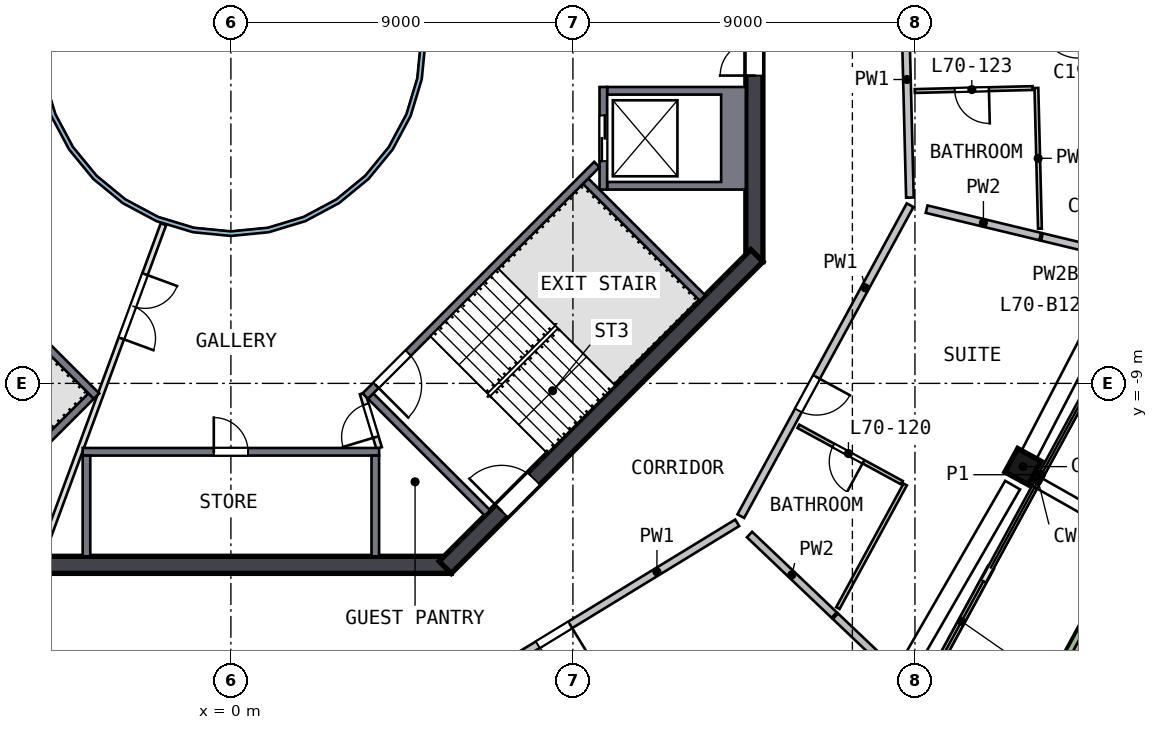
"""IFC4 building model, lengths in metres.
Left out: names, types, materials, properties, quantities, classifications, styles, units other than length and angle.
Written with IfcOpenShell. Run it as: python <this file> out.ifc"""

import sys

from ifc_helpers import new_model, si_unit, direction, frame, frame_2d, origin, origin_2d, place, context, subcontext, project, spatial, polyline, rectangle, outline, extrude, element, fill, save


model = new_model("IFC4")
c1 = context("Model", 3, precision=1e-05, world=origin(), true_north=direction((0.0, 1.0)))
c2 = subcontext(c1, "Body", "Model", "MODEL_VIEW")
j1 = project(units=[si_unit("LENGTHUNIT", "METRE"), si_unit("PLANEANGLEUNIT", "RADIAN")], contexts=[c1])
p1 = place(None, origin())
s1 = spatial("IfcSite", under=j1, at=p1, CompositionType="ELEMENT")
p2 = place(p1, origin())
s2 = spatial("IfcBuilding", under=s1, at=p2, CompositionType="ELEMENT")
p3 = place(p2, frame((0.0, 0.0, 284.5)))
s3 = spatial("IfcBuildingStorey", under=s2, at=p3, CompositionType="ELEMENT", Elevation=284.5)
p4 = place(p3, frame((20.78, -11.311, 0.0), z_axis=(0.053005442, 0.099318662, 0.993642907), x_axis=(0.475262413, 0.872612609, -0.112573854)))
e1 = element("IfcColumn", 1, at=p4, inside=s3, PredefinedType="COLUMN", context=c2, shape_type="SweptSolid", body=[
    extrude(rectangle(XDim=0.7, YDim=0.7, at=origin_2d()), origin(), (0.0, 0.0, 1.0), 3.21),
])
p5 = place(p3, frame((13.775, -5.799, 0.0), z_axis=(0.0, 0.0, 1.0), x_axis=(0.0, 1.0, 0.0)))
e2 = element("IfcWall", 2, at=p5, inside=s3, PredefinedType="SHEAR", context=c2, shape_type="SweptSolid", body=[
    extrude(rectangle(XDim=11.598, YDim=0.45, at=frame_2d((5.799, 0.0))), origin(), (0.0, 0.0, 1.0), 3.5),
])
p6 = place(p5, frame((4.899, 0.0, 0.0)))
e3 = element("IfcOpeningElement", 3, at=p6, cuts=e2, PredefinedType="OPENING", context=c2, shape_type="SweptSolid", body=[
    extrude(rectangle(XDim=1.8, YDim=2.1, at=frame_2d((0.9, 1.05))), frame((0.0, 0.235, 0.0), z_axis=(0.0, -1.0, 0.0), x_axis=(1.0, 0.0, 0.0)), (0.0, 0.0, 1.0), 0.47),
])
p7 = place(p3, frame((-5.799, -13.775, 0.0), z_axis=(0.0, 0.0, 1.0), x_axis=(1.0, 0.0, 0.0)))
e4 = element("IfcWall", 4, at=p7, inside=s3, PredefinedType="SHEAR", context=c2, shape_type="SweptSolid", body=[
    extrude(rectangle(XDim=11.598, YDim=0.45, at=frame_2d((5.799, 0.0))), origin(), (0.0, 0.0, 1.0), 3.5),
])
p8 = place(p3, frame((5.64, -13.841, 0.0), z_axis=(0.0, 0.0, 1.0), x_axis=(0.707106781, 0.707106781, 0.0)))
e5 = element("IfcWall", 5, at=p8, inside=s3, PredefinedType="SHEAR", context=c2, shape_type="SweptSolid", body=[
    extrude(rectangle(XDim=11.598, YDim=0.45, at=frame_2d((5.799, 0.0))), origin(), (0.0, 0.0, 1.0), 3.5),
])
p9 = place(p8, frame((2.099, 0.0, 0.0)))
e6 = element("IfcOpeningElement", 6, at=p9, cuts=e5, PredefinedType="OPENING", context=c2, shape_type="SweptSolid", body=[
    extrude(rectangle(XDim=1.2, YDim=2.1, at=frame_2d((0.6, 1.05))), frame((0.0, 0.235, 0.0), z_axis=(0.0, -1.0, 0.0), x_axis=(1.0, 0.0, 0.0)), (0.0, 0.0, 1.0), 0.47),
])
p10 = place(p3, frame((18.181, -17.183, 0.0), z_axis=(0.0, 0.0, 1.0), x_axis=(0.478120193, 0.878294416, 0.0)))
e7 = element("IfcWall", 7, at=p10, inside=s3, PredefinedType="SOLIDWALL", context=c2, shape_type="SweptSolid", body=[
    extrude(rectangle(XDim=3.787, YDim=0.15, at=frame_2d((1.894, 0.0))), origin(), (0.0, 0.0, 1.0), 2.525),
])
p11 = place(p10, frame((0.987, 0.0, 0.0)))
e8 = element("IfcOpeningElement", 8, at=p11, cuts=e7, PredefinedType="OPENING", context=c2, shape_type="SweptSolid", body=[
    extrude(rectangle(XDim=2.4, YDim=2.4, at=frame_2d((1.2, 1.2))), frame((0.0, 0.085, 0.0), z_axis=(0.0, -1.0, 0.0), x_axis=(1.0, 0.0, 0.0)), (0.0, 0.0, 1.0), 0.17),
])
p12 = place(p3, frame((21.029, -18.278, 0.0), z_axis=(0.0, 0.0, 1.0), x_axis=(0.478078384, 0.878317174, 0.0)))
e9 = element("IfcWall", 9, at=p12, inside=s3, PredefinedType="SOLIDWALL", context=c2, shape_type="SweptSolid", body=[
    extrude(rectangle(XDim=13.223, YDim=0.5, at=frame_2d((6.612, 0.0))), origin(), (0.0, 0.0, 1.0), 0.7),
])
p13 = place(p3, origin())
e10 = element("IfcWall", 10, at=p13, inside=s3, PredefinedType="SOLIDWALL", context=c2, shape_type="SweptSolid", body=[
    extrude(outline(polyline([(13.55, -3.9), (9.9, -3.9), (9.9, -3.7), (12.9, -3.7), (12.9, -1.4), (9.9, -1.4), (9.9, -1.2), (13.55, -1.2), (13.55, -3.9)])), origin(), (0.0, 0.0, 1.0), 3.19),
])
p14 = place(p3, frame((9.8, -1.2, 0.0), z_axis=(0.0, 0.0, 1.0), x_axis=(0.0, -1.0, 0.0)))
e11 = element("IfcWall", 11, at=p14, inside=s3, PredefinedType="SOLIDWALL", context=c2, shape_type="SweptSolid", body=[
    extrude(rectangle(XDim=2.7, YDim=0.2, at=frame_2d((1.35, 0.0))), origin(), (0.0, 0.0, 1.0), 3.19),
])
p15 = place(p14, frame((0.75, 0.0, 0.0)))
e12 = element("IfcOpeningElement", 12, at=p15, cuts=e11, PredefinedType="OPENING", context=c2, shape_type="SweptSolid", body=[
    extrude(rectangle(XDim=1.2, YDim=2.1, at=frame_2d((0.6, 1.05))), frame((0.0, 0.11, 0.0), z_axis=(0.0, -1.0, 0.0), x_axis=(1.0, 0.0, 0.0)), (0.0, 0.0, 1.0), 0.22),
])
p16 = place(p3, frame((-3.9, -10.8, 0.0), z_axis=(0.0, 0.0, 1.0), x_axis=(1.0, 0.0, 0.0)))
e13 = element("IfcWall", 13, at=p16, inside=s3, PredefinedType="SOLIDWALL", context=c2, shape_type="SweptSolid", body=[
    extrude(rectangle(XDim=7.8, YDim=0.2, at=frame_2d((3.9, 0.0))), origin(), (0.0, 0.0, 1.0), 3.19),
])
p17 = place(p16, frame((3.45, 0.0, 0.0)))
e14 = element("IfcOpeningElement", 14, at=p17, cuts=e13, PredefinedType="OPENING", context=c2, shape_type="SweptSolid", body=[
    extrude(rectangle(XDim=0.9, YDim=2.1, at=frame_2d((0.45, 1.05))), frame((0.0, 0.11, 0.0), z_axis=(0.0, -1.0, 0.0), x_axis=(1.0, 0.0, 0.0)), (0.0, 0.0, 1.0), 0.22),
])
for number, where, z_axis, x_axis in (
    (15, (-3.8, -10.9, 0.0), (0.0, 0.0, 1.0), (0.0, -1.0, 0.0)),
    (16, (3.8, -10.9, 0.0), (0.0, 0.0, 1.0), (0.0, -1.0, 0.0)),
):
    element("IfcWall", number, at=place(p3, frame(where, z_axis=z_axis, x_axis=x_axis)), inside=s3, PredefinedType="SOLIDWALL", context=c2, shape_type="SweptSolid", body=[
        extrude(rectangle(XDim=2.65, YDim=0.2, at=frame_2d((1.325, 0.0))), origin(), (0.0, 0.0, 1.0), 3.19),
    ])
p18 = place(p3, frame((-3.535, -9.334, 0.0), z_axis=(0.0, 0.0, 1.0), x_axis=(-0.707120946, 0.707092617, 0.0)))
e17 = element("IfcWall", 17, at=p18, inside=s3, PredefinedType="SOLIDWALL", context=c2, shape_type="SweptSolid", body=[
    extrude(rectangle(XDim=8.618, YDim=0.2, at=frame_2d((4.309, 0.0))), origin(), (0.0, 0.0, 1.0), 3.19),
])
p19 = place(p18, frame((6.6, 0.0, 0.0)))
e18 = element("IfcOpeningElement", 18, at=p19, cuts=e17, PredefinedType="OPENING", context=c2, shape_type="SweptSolid", body=[
    extrude(rectangle(XDim=1.2, YDim=2.1, at=frame_2d((0.6, 1.05))), frame((0.0, 0.11, 0.0), z_axis=(0.0, -1.0, 0.0), x_axis=(1.0, 0.0, 0.0)), (0.0, 0.0, 1.0), 0.22),
])
p20 = place(p3, frame((-3.677, -9.334, 0.0), z_axis=(0.0, 0.0, 1.0), x_axis=(-0.707106781, -0.707106781, 0.0)))
e19 = element("IfcWall", 19, at=p20, inside=s3, PredefinedType="SOLIDWALL", context=c2, shape_type="SweptSolid", body=[
    extrude(rectangle(XDim=4.35, YDim=0.2, at=frame_2d((2.175, 0.0))), origin(), (0.0, 0.0, 1.0), 3.19),
])
p21 = place(p3, frame((9.629, -3.24, 0.0), z_axis=(0.0, 0.0, 1.0), x_axis=(-0.707120946, -0.707092617, 0.0)))
e20 = element("IfcWall", 20, at=p21, inside=s3, PredefinedType="SOLIDWALL", context=c2, shape_type="SweptSolid", body=[
    extrude(rectangle(XDim=8.618, YDim=0.2, at=frame_2d((4.309, 0.0))), origin(), (0.0, 0.0, 1.0), 3.19),
])
p22 = place(p21, frame((7.018, 0.0, 0.0)))
e21 = element("IfcOpeningElement", 21, at=p22, cuts=e20, PredefinedType="OPENING", context=c2, shape_type="SweptSolid", body=[
    extrude(rectangle(XDim=1.2, YDim=2.1, at=frame_2d((0.6, 1.05))), frame((0.0, 0.11, 0.0), z_axis=(0.0, -1.0, 0.0), x_axis=(1.0, 0.0, 0.0)), (0.0, 0.0, 1.0), 0.22),
])
for number, where, z_axis, x_axis in (
    (22, (3.677, -9.334, 0.0), (0.0, 0.0, 1.0), (0.707, -0.707, 0.0)),
    (23, (9.334, -3.677, 0.0), (0.0, 0.0, 1.0), (0.707, -0.707, 0.0)),
):
    element("IfcWall", number, at=place(p3, frame(where, z_axis=z_axis, x_axis=x_axis)), inside=s3, PredefinedType="SOLIDWALL", context=c2, shape_type="SweptSolid", body=[
        extrude(rectangle(XDim=4.35, YDim=0.2, at=frame_2d((2.175, 0.0))), origin(), (0.0, 0.0, 1.0), 3.19),
    ])
p23 = place(p3, frame((3.9, -10.7, 0.0), z_axis=(0.0, 0.0, 1.0), x_axis=(-0.289808785, 0.957084567, 0.0)))
e24 = element("IfcWall", 24, at=p23, inside=s3, PredefinedType="PARTITIONING", context=c2, shape_type="SweptSolid", body=[
    extrude(rectangle(XDim=1.501, YDim=0.15, at=frame_2d((0.75, 0.0))), origin(), (0.0, 0.0, 1.0), 3.19),
])
p24 = place(p23, frame((0.301, 0.0, 0.0)))
e25 = element("IfcOpeningElement", 25, at=p24, cuts=e24, PredefinedType="OPENING", context=c2, shape_type="SweptSolid", body=[
    extrude(rectangle(XDim=0.9, YDim=2.1, at=frame_2d((0.45, 1.05))), frame((0.0, 0.085, 0.0), z_axis=(0.0, -1.0, 0.0), x_axis=(1.0, 0.0, 0.0)), (0.0, 0.0, 1.0), 0.17),
])
p25 = place(p3, frame((-1.776, -4.813, 0.0), z_axis=(0.0, 0.0, 1.0), x_axis=(-0.346114844, -0.938192152, 0.0)))
e26 = element("IfcWall", 26, at=p25, inside=s3, PredefinedType="PARTITIONING", context=c2, shape_type="SweptSolid", body=[
    extrude(rectangle(XDim=9.283, YDim=0.15, at=frame_2d((4.641, 0.0))), origin(), (0.0, 0.0, 1.0), 3.19),
])
p26 = place(p25, frame((1.4, 0.0, 0.0)))
e27 = element("IfcOpeningElement", 27, at=p26, cuts=e26, PredefinedType="OPENING", context=c2, shape_type="SweptSolid", body=[
    extrude(rectangle(XDim=1.8, YDim=2.1, at=frame_2d((0.9, 1.05))), frame((0.0, 0.085, 0.0), z_axis=(0.0, -1.0, 0.0), x_axis=(1.0, 0.0, 0.0)), (0.0, 0.0, 1.0), 0.17),
])
p27 = place(p3, origin())
e28 = element("IfcWall", 28, at=p27, inside=s3, PredefinedType="SOLIDWALL", context=c2, shape_type="SweptSolid", body=[
    extrude(outline(polyline([(5.021, -0.999), (4.73, -1.959), (4.257, -2.844), (3.62, -3.62), (2.844, -4.257), (1.959, -4.73), (0.999, -5.021), (0.0, -5.12), (-0.999, -5.021), (-1.959, -4.73), (-2.844, -4.257), (-3.62, -3.62), (-4.257, -2.844), (-4.73, -1.959), (-5.021, -0.999), (-5.12, 0.0), (-5.021, 0.999), (-4.73, 1.959), (-4.257, 2.844), (-3.62, 3.62), (-2.844, 4.257), (-1.959, 4.73), (-0.999, 5.021), (0.0, 5.12), (0.999, 5.021), (1.959, 4.73), (2.844, 4.257), (3.62, 3.62), (4.257, 2.844), (4.73, 1.959), (5.021, 0.999), (5.12, 0.0), (5.021, -0.999)]), holes=[polyline([(4.904, 0.976), (4.619, 1.913), (4.157, 2.778), (3.535, 3.535), (2.778, 4.157), (1.913, 4.619), (0.976, 4.904), (0.0, 5.0), (-0.976, 4.904), (-1.913, 4.619), (-2.778, 4.157), (-3.535, 3.535), (-4.157, 2.778), (-4.619, 1.913), (-4.904, 0.976), (-5.0, 0.0), (-4.904, -0.976), (-4.619, -1.913), (-4.157, -2.778), (-3.535, -3.535), (-2.778, -4.157), (-1.913, -4.619), (-0.976, -4.904), (0.0, -5.0), (0.976, -4.904), (1.913, -4.619), (2.778, -4.157), (3.535, -3.535), (4.157, -2.778), (4.619, -1.913), (4.904, -0.976), (5.0, 0.0), (4.904, 0.976)])]), origin(), (0.0, 0.0, 1.0), 3.19),
])
p28 = place(p3, frame((-4.486, -17.777, 0.0), z_axis=(0.0, 0.0, 1.0), x_axis=(-0.878320972, 0.478071407, 0.0)))
e29 = element("IfcWall", 29, at=p28, inside=s3, PredefinedType="SOLIDWALL", context=c2, shape_type="SweptSolid", body=[
    extrude(rectangle(XDim=9.117, YDim=0.2, at=frame_2d((4.558, 0.0))), origin(), (0.0, 0.0, 1.0), 3.19),
])
p29 = place(p28, frame((6.458, 0.0, 0.0)))
e30 = element("IfcOpeningElement", 30, at=p29, cuts=e29, PredefinedType="OPENING", context=c2, shape_type="SweptSolid", body=[
    extrude(rectangle(XDim=1.0, YDim=2.1, at=frame_2d((0.5, 1.05))), frame((0.0, 0.11, 0.0), z_axis=(0.0, -1.0, 0.0), x_axis=(1.0, 0.0, 0.0)), (0.0, 0.0, 1.0), 0.22),
])
p30 = place(p3, frame((13.323, -12.669, 0.0), z_axis=(0.0, 0.0, 1.0), x_axis=(-0.853183358, -0.521611117, 0.0)))
e31 = element("IfcWall", 31, at=p30, inside=s3, PredefinedType="SOLIDWALL", context=c2, shape_type="SweptSolid", body=[
    extrude(rectangle(XDim=9.317, YDim=0.2, at=frame_2d((4.658, 0.0))), origin(), (0.0, 0.0, 1.0), 3.19),
])
p31 = place(p30, frame((5.15, 0.0, 0.0)))
e32 = element("IfcOpeningElement", 32, at=p31, cuts=e31, PredefinedType="OPENING", context=c2, shape_type="SweptSolid", body=[
    extrude(rectangle(XDim=1.0, YDim=2.1, at=frame_2d((0.5, 1.05))), frame((0.0, 0.11, 0.0), z_axis=(0.0, -1.0, 0.0), x_axis=(1.0, 0.0, 0.0)), (0.0, 0.0, 1.0), 0.22),
])
p32 = place(p3, frame((17.872, -4.311, 0.0), z_axis=(0.0, 0.0, 1.0), x_axis=(-0.478084491, -0.87831385, 0.0)))
e33 = element("IfcWall", 33, at=p32, inside=s3, PredefinedType="SOLIDWALL", context=c2, shape_type="SweptSolid", body=[
    extrude(rectangle(XDim=9.317, YDim=0.2, at=frame_2d((4.658, 0.0))), origin(), (0.0, 0.0, 1.0), 3.19),
])
p33 = place(p32, frame((5.15, 0.0, 0.0)))
e34 = element("IfcOpeningElement", 34, at=p33, cuts=e33, PredefinedType="OPENING", context=c2, shape_type="SweptSolid", body=[
    extrude(rectangle(XDim=1.0, YDim=2.1, at=frame_2d((0.5, 1.05))), frame((0.0, 0.11, 0.0), z_axis=(0.0, -1.0, 0.0), x_axis=(1.0, 0.0, 0.0)), (0.0, 0.0, 1.0), 0.22),
])
p34 = place(p3, frame((17.633, 5.203, 0.0), z_axis=(0.0, 0.0, 1.0), x_axis=(0.025130335, -0.999684183, 0.0)))
e35 = element("IfcWall", 35, at=p34, inside=s3, PredefinedType="SOLIDWALL", context=c2, shape_type="SweptSolid", body=[
    extrude(rectangle(XDim=9.317, YDim=0.2, at=frame_2d((4.658, 0.0))), origin(), (0.0, 0.0, 1.0), 3.19),
])
p35 = place(p34, frame((1.9, 0.0, 0.0)))
e36 = element("IfcOpeningElement", 36, at=p35, cuts=e35, PredefinedType="OPENING", context=c2, shape_type="SweptSolid", body=[
    extrude(rectangle(XDim=1.0, YDim=2.1, at=frame_2d((0.5, 1.05))), frame((0.0, 0.11, 0.0), z_axis=(0.0, -1.0, 0.0), x_axis=(1.0, 0.0, 0.0)), (0.0, 0.0, 1.0), 0.22),
])
p36 = place(p3, frame((13.647, -12.977, 0.0), z_axis=(0.0, 0.0, 1.0), x_axis=(0.724630592, -0.689137509, 0.0)))
e37 = element("IfcWall", 37, at=p36, inside=s3, PredefinedType="SOLIDWALL", context=c2, shape_type="SweptSolid", body=[
    extrude(rectangle(XDim=3.075, YDim=0.2, at=frame_2d((1.537, 0.0))), origin(), (0.0, 0.0, 1.0), 3.19),
])
p37 = place(p3, frame((15.908, -15.128, 0.0), z_axis=(0.0, 0.0, 1.0), x_axis=(0.724639029, -0.689128636, 0.0)))
e38 = element("IfcWall", 38, at=p37, inside=s3, PredefinedType="SOLIDWALL", context=c2, shape_type="SweptSolid", body=[
    extrude(rectangle(XDim=3.011, YDim=0.2, at=frame_2d((1.506, 0.0))), origin(), (0.0, 0.0, 1.0), 3.19),
])
p38 = place(p3, frame((18.307, -4.415, 0.0), z_axis=(0.0, 0.0, 1.0), x_axis=(0.972122163, -0.234474945, 0.0)))
e39 = element("IfcWall", 39, at=p38, inside=s3, PredefinedType="SOLIDWALL", context=c2, shape_type="SweptSolid", body=[
    extrude(rectangle(XDim=3.075, YDim=0.2, at=frame_2d((1.537, 0.0))), origin(), (0.0, 0.0, 1.0), 3.19),
])
p39 = place(p3, frame((21.341, -5.147, 0.0), z_axis=(0.0, 0.0, 1.0), x_axis=(0.972121732, -0.234476735, 0.0)))
e40 = element("IfcWall", 40, at=p39, inside=s3, PredefinedType="SOLIDWALL", context=c2, shape_type="SweptSolid", body=[
    extrude(rectangle(XDim=3.011, YDim=0.2, at=frame_2d((1.506, 0.0))), origin(), (0.0, 0.0, 1.0), 2.69),
])
p40 = place(p3, frame((17.655, -11.612, 0.0), z_axis=(0.0, 0.0, 1.0), x_axis=(-0.87832263, 0.478068361, 0.0)))
e41 = element("IfcWall", 41, at=p40, inside=s3, PredefinedType="PARTITIONING", context=c2, shape_type="SweptSolid", body=[
    extrude(rectangle(XDim=3.1, YDim=0.1, at=frame_2d((1.55, 0.0))), origin(), (0.0, 0.0, 1.0), 3.19),
])
p41 = place(p40, frame((1.15, 0.0, 0.0)))
e42 = element("IfcOpeningElement", 42, at=p41, cuts=e41, PredefinedType="OPENING", context=c2, shape_type="SweptSolid", body=[
    extrude(rectangle(XDim=0.9, YDim=2.1, at=frame_2d((0.45, 1.05))), frame((0.0, 0.06, 0.0), z_axis=(0.0, -1.0, 0.0), x_axis=(1.0, 0.0, 0.0)), (0.0, 0.0, 1.0), 0.12),
])
p42 = place(p3, frame((17.743, -11.66, 0.0), z_axis=(0.0, 0.0, 1.0), x_axis=(-0.478053023, -0.878330978, 0.0)))
e43 = element("IfcWall", 43, at=p42, inside=s3, PredefinedType="PARTITIONING", context=c2, shape_type="SweptSolid", body=[
    extrude(rectangle(XDim=3.704, YDim=0.1, at=frame_2d((1.852, 0.0))), origin(), (0.0, 0.0, 1.0), 3.19),
])
p43 = place(p3, frame((21.096, -1.229, 0.0), z_axis=(0.0, 0.0, 1.0), x_axis=(-0.999684391, -0.025122051, 0.0)))
e44 = element("IfcWall", 44, at=p43, inside=s3, PredefinedType="PARTITIONING", context=c2, shape_type="SweptSolid", body=[
    extrude(rectangle(XDim=3.1, YDim=0.1, at=frame_2d((1.55, 0.0))), origin(), (0.0, 0.0, 1.0), 3.19),
])
p44 = place(p43, frame((1.15, 0.0, 0.0)))
e45 = element("IfcOpeningElement", 45, at=p44, cuts=e44, PredefinedType="OPENING", context=c2, shape_type="SweptSolid", body=[
    extrude(rectangle(XDim=0.9, YDim=2.1, at=frame_2d((0.45, 1.05))), frame((0.0, 0.06, 0.0), z_axis=(0.0, -1.0, 0.0), x_axis=(1.0, 0.0, 0.0)), (0.0, 0.0, 1.0), 0.12),
])
p45 = place(p3, frame((21.289, -4.929, 0.0), z_axis=(0.0, 0.0, 1.0), x_axis=(-0.025112405, 0.999684634, 0.0)))
e46 = element("IfcWall", 46, at=p45, inside=s3, PredefinedType="PARTITIONING", context=c2, shape_type="SweptSolid", body=[
    extrude(rectangle(XDim=3.704, YDim=0.1, at=frame_2d((1.852, 0.0))), origin(), (0.0, 0.0, 1.0), 3.19),
])
p46 = place(p11, origin())
e47 = element("IfcDoor", 47, at=p46, inside=s3, OperationType="SLIDING_TO_LEFT", PredefinedType="DOOR", context=c2, shape_type="SweptSolid", body=[
    extrude(rectangle(XDim=2.4, YDim=2.4, at=frame_2d((1.2, 1.2))), frame((0.0, 0.025, 0.0), z_axis=(0.0, -1.0, 0.0), x_axis=(1.0, 0.0, 0.0)), (0.0, 0.0, 1.0), 0.05),
])
fill(e8, e47)
p47 = place(p17, origin())
e48 = element("IfcDoor", 48, at=p47, inside=s3, OperationType="SINGLE_SWING_LEFT", PredefinedType="DOOR", context=c2, shape_type="SweptSolid", body=[
    extrude(rectangle(XDim=0.9, YDim=2.1, at=frame_2d((0.45, 1.05))), frame((0.0, 0.025, 0.0), z_axis=(0.0, -1.0, 0.0), x_axis=(1.0, 0.0, 0.0)), (0.0, 0.0, 1.0), 0.05),
])
fill(e14, e48)
p48 = place(p15, origin())
e49 = element("IfcDoor", 49, at=p48, inside=s3, OperationType="DOUBLE_DOOR_SLIDING", PredefinedType="DOOR", context=c2, shape_type="SweptSolid", body=[
    extrude(rectangle(XDim=1.2, YDim=2.1, at=frame_2d((0.6, 1.05))), frame((0.0, 0.025, 0.0), z_axis=(0.0, -1.0, 0.0), x_axis=(1.0, 0.0, 0.0)), (0.0, 0.0, 1.0), 0.05),
])
fill(e12, e49)
p49 = place(p22, origin())
e50 = element("IfcDoor", 50, at=p49, inside=s3, OperationType="SINGLE_SWING_RIGHT", PredefinedType="DOOR", context=c2, shape_type="SweptSolid", body=[
    extrude(rectangle(XDim=1.2, YDim=2.1, at=frame_2d((0.6, 1.05))), frame((0.0, 0.025, 0.0), z_axis=(0.0, -1.0, 0.0), x_axis=(1.0, 0.0, 0.0)), (0.0, 0.0, 1.0), 0.05),
])
fill(e21, e50)
p50 = place(p6, origin())
e51 = element("IfcDoor", 51, at=p50, inside=s3, OperationType="DOUBLE_DOOR_SINGLE_SWING", PredefinedType="DOOR", context=c2, shape_type="SweptSolid", body=[
    extrude(rectangle(XDim=1.8, YDim=2.1, at=frame_2d((0.9, 1.05))), frame((0.0, 0.025, 0.0), z_axis=(0.0, -1.0, 0.0), x_axis=(1.0, 0.0, 0.0)), (0.0, 0.0, 1.0), 0.05),
])
fill(e3, e51)
p51 = place(p9, origin())
e52 = element("IfcDoor", 52, at=p51, inside=s3, OperationType="SINGLE_SWING_LEFT", PredefinedType="DOOR", context=c2, shape_type="SweptSolid", body=[
    extrude(rectangle(XDim=1.2, YDim=2.1, at=frame_2d((0.6, 1.05))), frame((0.0, 0.025, 0.0), z_axis=(0.0, -1.0, 0.0), x_axis=(1.0, 0.0, 0.0)), (0.0, 0.0, 1.0), 0.05),
])
fill(e6, e52)
p52 = place(p24, origin())
e53 = element("IfcDoor", 53, at=p52, inside=s3, OperationType="SINGLE_SWING_LEFT", PredefinedType="DOOR", context=c2, shape_type="SweptSolid", body=[
    extrude(rectangle(XDim=0.9, YDim=2.1, at=frame_2d((0.45, 1.05))), frame((0.0, 0.025, 0.0), z_axis=(0.0, -1.0, 0.0), x_axis=(1.0, 0.0, 0.0)), (0.0, 0.0, 1.0), 0.05),
])
fill(e25, e53)
p53 = place(p26, origin())
e54 = element("IfcDoor", 54, at=p53, inside=s3, OperationType="DOUBLE_DOOR_SINGLE_SWING", PredefinedType="DOOR", context=c2, shape_type="SweptSolid", body=[
    extrude(rectangle(XDim=1.8, YDim=2.1, at=frame_2d((0.9, 1.05))), frame((0.0, 0.025, 0.0), z_axis=(0.0, -1.0, 0.0), x_axis=(1.0, 0.0, 0.0)), (0.0, 0.0, 1.0), 0.05),
])
fill(e27, e54)
p54 = place(p31, origin())
e55 = element("IfcDoor", 55, at=p54, inside=s3, OperationType="SINGLE_SWING_LEFT", PredefinedType="DOOR", context=c2, shape_type="SweptSolid", body=[
    extrude(rectangle(XDim=1.0, YDim=2.1, at=frame_2d((0.5, 1.05))), frame((0.0, 0.025, 0.0), z_axis=(0.0, -1.0, 0.0), x_axis=(1.0, 0.0, 0.0)), (0.0, 0.0, 1.0), 0.05),
])
fill(e32, e55)
p55 = place(p33, origin())
e56 = element("IfcDoor", 56, at=p55, inside=s3, OperationType="SINGLE_SWING_LEFT", PredefinedType="DOOR", context=c2, shape_type="SweptSolid", body=[
    extrude(rectangle(XDim=1.0, YDim=2.1, at=frame_2d((0.5, 1.05))), frame((0.0, 0.025, 0.0), z_axis=(0.0, -1.0, 0.0), x_axis=(1.0, 0.0, 0.0)), (0.0, 0.0, 1.0), 0.05),
])
fill(e34, e56)
p56 = place(p41, origin())
e57 = element("IfcDoor", 57, at=p56, inside=s3, OperationType="SINGLE_SWING_LEFT", PredefinedType="DOOR", context=c2, shape_type="SweptSolid", body=[
    extrude(rectangle(XDim=0.9, YDim=2.1, at=frame_2d((0.45, 1.05))), frame((0.0, 0.025, 0.0), z_axis=(0.0, -1.0, 0.0), x_axis=(1.0, 0.0, 0.0)), (0.0, 0.0, 1.0), 0.05),
])
fill(e42, e57)
p57 = place(p44, origin())
e58 = element("IfcDoor", 58, at=p57, inside=s3, OperationType="SINGLE_SWING_LEFT", PredefinedType="DOOR", context=c2, shape_type="SweptSolid", body=[
    extrude(rectangle(XDim=0.9, YDim=2.1, at=frame_2d((0.45, 1.05))), frame((0.0, 0.025, 0.0), z_axis=(0.0, -1.0, 0.0), x_axis=(1.0, 0.0, 0.0)), (0.0, 0.0, 1.0), 0.05),
])
fill(e45, e58)
save(model, sys.argv[1])
